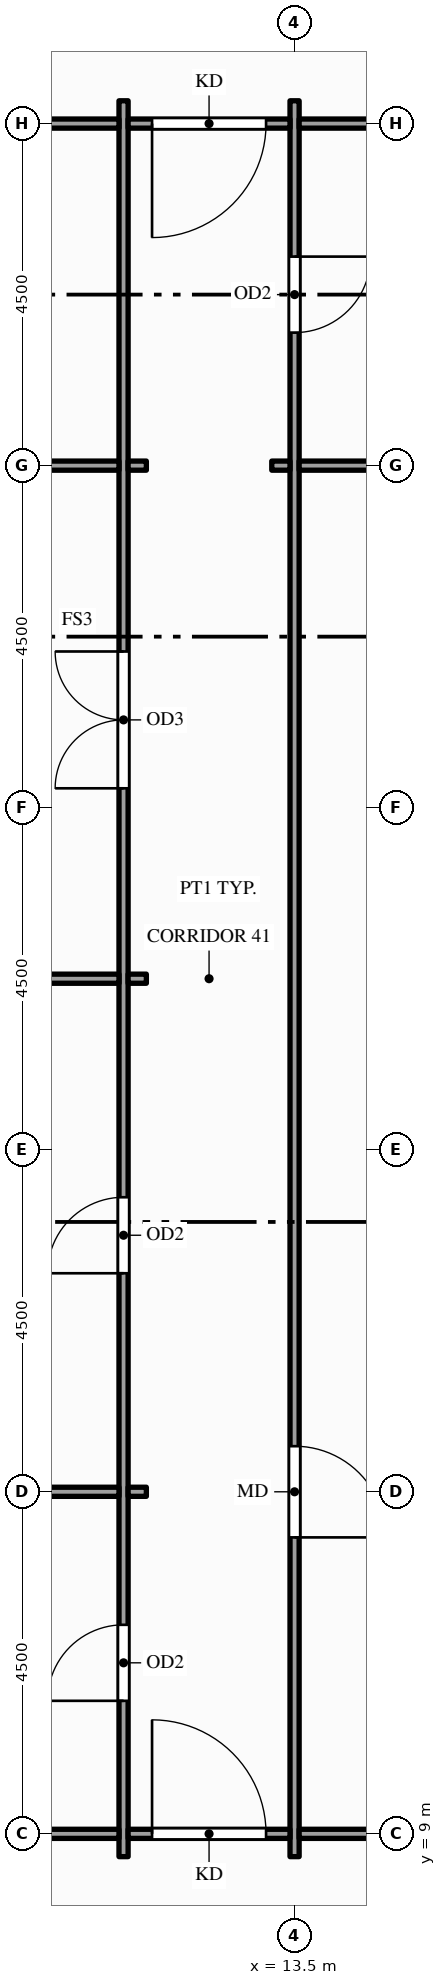
"""IFC4 building model, lengths in metres.
Left out: names, types, materials, properties, quantities, classifications, styles, units other than length and angle.
Written with IfcOpenShell. Run it as: python <this file> out.ifc"""

import sys

from ifc_helpers import new_model, si_unit, direction, frame, frame_2d, origin, place, context, subcontext, project, spatial, rectangle, extrude, element, fill, save


model = new_model("IFC4")
c1 = context("Model", 3, precision=1e-05, world=origin(), true_north=direction((0.0, 1.0)))
c2 = subcontext(c1, "Body", "Model", "MODEL_VIEW")
j1 = project(units=[si_unit("LENGTHUNIT", "METRE"), si_unit("PLANEANGLEUNIT", "RADIAN")], contexts=[c1])
p1 = place(None, origin())
s1 = spatial("IfcSite", under=j1, at=p1, CompositionType="ELEMENT")
p2 = place(p1, origin())
s2 = spatial("IfcBuilding", under=s1, at=p2, CompositionType="ELEMENT")
p3 = place(p2, frame((0.0, 0.0, 57.0)))
s3 = spatial("IfcBuildingStorey", under=s2, at=p3, CompositionType="ELEMENT", Elevation=57.0)
p4 = place(p3, frame((11.25, 8.7, 0.0), z_axis=(0.0, 0.0, 1.0), x_axis=(0.0, 1.0, 0.0)))
e1 = element("IfcWall", 1, at=p4, inside=s3, PredefinedType="PARTITIONING", context=c2, shape_type="SweptSolid", body=[
    extrude(rectangle(XDim=23.1, YDim=0.12, at=frame_2d((11.55, 0.0))), origin(), (0.0, 0.0, 1.0), 2.6),
])
p5 = place(p4, frame((2.05, 0.0, 0.0)))
e2 = element("IfcOpeningElement", 2, at=p5, cuts=e1, PredefinedType="OPENING", context=c2, shape_type="SweptSolid", body=[
    extrude(rectangle(XDim=1.0, YDim=2.1, at=frame_2d((0.5, 1.05))), frame((0.0, 0.07, 0.0), z_axis=(0.0, -1.0, 0.0), x_axis=(1.0, 0.0, 0.0)), (0.0, 0.0, 1.0), 0.14),
])
p6 = place(p4, frame((7.675, 0.0, 0.0)))
e3 = element("IfcOpeningElement", 3, at=p6, cuts=e1, PredefinedType="OPENING", context=c2, shape_type="SweptSolid", body=[
    extrude(rectangle(XDim=1.0, YDim=2.1, at=frame_2d((0.5, 1.05))), frame((0.0, 0.07, 0.0), z_axis=(0.0, -1.0, 0.0), x_axis=(1.0, 0.0, 0.0)), (0.0, 0.0, 1.0), 0.14),
])
p7 = place(p4, frame((14.055, 0.0, 0.0)))
e4 = element("IfcOpeningElement", 4, at=p7, cuts=e1, PredefinedType="OPENING", context=c2, shape_type="SweptSolid", body=[
    extrude(rectangle(XDim=1.8, YDim=2.1, at=frame_2d((0.9, 1.05))), frame((0.0, 0.07, 0.0), z_axis=(0.0, -1.0, 0.0), x_axis=(1.0, 0.0, 0.0)), (0.0, 0.0, 1.0), 0.14),
])
p8 = place(p3, frame((13.5, 8.7, 0.0), z_axis=(0.0, 0.0, 1.0), x_axis=(0.0, 1.0, 0.0)))
e5 = element("IfcWall", 5, at=p8, inside=s3, PredefinedType="PARTITIONING", context=c2, shape_type="SweptSolid", body=[
    extrude(rectangle(XDim=23.1, YDim=0.12, at=frame_2d((11.55, 0.0))), origin(), (0.0, 0.0, 1.0), 2.6),
])
p9 = place(p8, frame((20.05, 0.0, 0.0)))
e6 = element("IfcOpeningElement", 6, at=p9, cuts=e5, PredefinedType="OPENING", context=c2, shape_type="SweptSolid", body=[
    extrude(rectangle(XDim=1.0, YDim=2.1, at=frame_2d((0.5, 1.05))), frame((0.0, 0.07, 0.0), z_axis=(0.0, -1.0, 0.0), x_axis=(1.0, 0.0, 0.0)), (0.0, 0.0, 1.0), 0.14),
])
p10 = place(p8, frame((4.2, 0.0, 0.0)))
e7 = element("IfcOpeningElement", 7, at=p10, cuts=e5, PredefinedType="OPENING", context=c2, shape_type="SweptSolid", body=[
    extrude(rectangle(XDim=1.2, YDim=2.1, at=frame_2d((0.6, 1.05))), frame((0.0, 0.07, 0.0), z_axis=(0.0, -1.0, 0.0), x_axis=(1.0, 0.0, 0.0)), (0.0, 0.0, 1.0), 0.14),
])
p11 = place(p3, frame((0.15, 9.0, 0.0), z_axis=(0.0, 0.0, 1.0), x_axis=(1.0, 0.0, 0.0)))
e8 = element("IfcWall", 8, at=p11, inside=s3, PredefinedType="PARTITIONING", context=c2, shape_type="SweptSolid", body=[
    extrude(rectangle(XDim=11.04, YDim=0.12, at=frame_2d((5.52, 0.0))), origin(), (0.0, 0.0, 1.0), 2.938),
])
p12 = place(p3, frame((11.31, 9.0, 0.0), z_axis=(0.0, 0.0, 1.0), x_axis=(1.0, 0.0, 0.0)))
e9 = element("IfcWall", 9, at=p12, inside=s3, PredefinedType="PARTITIONING", context=c2, shape_type="SweptSolid", body=[
    extrude(rectangle(XDim=2.13, YDim=0.12, at=frame_2d((1.065, 0.0))), origin(), (0.0, 0.0, 1.0), 2.938),
])
p13 = place(p12, frame((0.315, 0.0, 0.0)))
e10 = element("IfcOpeningElement", 10, at=p13, cuts=e9, PredefinedType="OPENING", context=c2, shape_type="SweptSolid", body=[
    extrude(rectangle(XDim=1.5, YDim=2.1, at=frame_2d((0.75, 1.05))), frame((0.0, 0.07, 0.0), z_axis=(0.0, -1.0, 0.0), x_axis=(1.0, 0.0, 0.0)), (0.0, 0.0, 1.0), 0.14),
])
p14 = place(p3, frame((13.56, 9.0, 0.0), z_axis=(0.0, 0.0, 1.0), x_axis=(1.0, 0.0, 0.0)))
e11 = element("IfcWall", 11, at=p14, inside=s3, PredefinedType="PARTITIONING", context=c2, shape_type="SweptSolid", body=[
    extrude(rectangle(XDim=13.38, YDim=0.12, at=frame_2d((6.69, 0.0))), origin(), (0.0, 0.0, 1.0), 2.938),
])
p15 = place(p14, frame((3.54, 0.0, 0.0)))
e12 = element("IfcOpeningElement", 12, at=p15, cuts=e11, PredefinedType="OPENING", context=c2, shape_type="SweptSolid", body=[
    extrude(rectangle(XDim=1.8, YDim=2.1, at=frame_2d((0.9, 1.05))), frame((0.0, 0.07, 0.0), z_axis=(0.0, -1.0, 0.0), x_axis=(1.0, 0.0, 0.0)), (0.0, 0.0, 1.0), 0.14),
])
p16 = place(p3, frame((0.15, 13.5, 0.0), z_axis=(0.0, 0.0, 1.0), x_axis=(1.0, 0.0, 0.0)))
e13 = element("IfcWall", 13, at=p16, inside=s3, PredefinedType="PARTITIONING", context=c2, shape_type="SweptSolid", body=[
    extrude(rectangle(XDim=11.04, YDim=0.12, at=frame_2d((5.52, 0.0))), origin(), (0.0, 0.0, 1.0), 2.938),
])
p17 = place(p3, frame((11.31, 13.5, 0.0), z_axis=(0.0, 0.0, 1.0), x_axis=(1.0, 0.0, 0.0)))
e14 = element("IfcWall", 14, at=p17, inside=s3, PredefinedType="PARTITIONING", context=c2, shape_type="SweptSolid", body=[
    extrude(rectangle(XDim=0.24, YDim=0.12, at=frame_2d((0.12, 0.0))), origin(), (0.0, 0.0, 1.0), 2.938),
])
p18 = place(p3, frame((0.15, 20.25, 0.0), z_axis=(0.0, 0.0, 1.0), x_axis=(1.0, 0.0, 0.0)))
e15 = element("IfcWall", 15, at=p18, inside=s3, PredefinedType="PARTITIONING", context=c2, shape_type="SweptSolid", body=[
    extrude(rectangle(XDim=11.04, YDim=0.12, at=frame_2d((5.52, 0.0))), origin(), (0.0, 0.0, 1.0), 2.938),
])
p19 = place(p3, frame((11.31, 20.25, 0.0), z_axis=(0.0, 0.0, 1.0), x_axis=(1.0, 0.0, 0.0)))
e16 = element("IfcWall", 16, at=p19, inside=s3, PredefinedType="PARTITIONING", context=c2, shape_type="SweptSolid", body=[
    extrude(rectangle(XDim=0.24, YDim=0.12, at=frame_2d((0.12, 0.0))), origin(), (0.0, 0.0, 1.0), 2.938),
])
p20 = place(p3, frame((7.06, 27.0, 0.0), z_axis=(0.0, 0.0, 1.0), x_axis=(1.0, 0.0, 0.0)))
e17 = element("IfcWall", 17, at=p20, inside=s3, PredefinedType="PARTITIONING", context=c2, shape_type="SweptSolid", body=[
    extrude(rectangle(XDim=4.13, YDim=0.12, at=frame_2d((2.065, 0.0))), origin(), (0.0, 0.0, 1.0), 2.938),
])
for number, where, z_axis, x_axis in (
    (18, (11.31, 27.0, 0.0), (0.0, 0.0, 1.0), (1.0, 0.0, 0.0)),
    (19, (13.2, 27.0, 0.0), (0.0, 0.0, 1.0), (1.0, 0.0, 0.0)),
):
    element("IfcWall", number, at=place(p3, frame(where, z_axis=z_axis, x_axis=x_axis)), inside=s3, PredefinedType="PARTITIONING", context=c2, shape_type="SweptSolid", body=[
        extrude(rectangle(XDim=0.24, YDim=0.12, at=frame_2d((0.12, 0.0))), origin(), (0.0, 0.0, 1.0), 2.938),
    ])
p21 = place(p3, frame((13.56, 27.0, 0.0), z_axis=(0.0, 0.0, 1.0), x_axis=(1.0, 0.0, 0.0)))
e20 = element("IfcWall", 20, at=p21, inside=s3, PredefinedType="PARTITIONING", context=c2, shape_type="SweptSolid", body=[
    extrude(rectangle(XDim=7.57, YDim=0.12, at=frame_2d((3.785, 0.0))), origin(), (0.0, 0.0, 1.0), 2.938),
])
p22 = place(p3, frame((7.06, 31.5, 0.0), z_axis=(0.0, 0.0, 1.0), x_axis=(1.0, 0.0, 0.0)))
e21 = element("IfcWall", 21, at=p22, inside=s3, PredefinedType="PARTITIONING", context=c2, shape_type="SweptSolid", body=[
    extrude(rectangle(XDim=4.13, YDim=0.12, at=frame_2d((2.065, 0.0))), origin(), (0.0, 0.0, 1.0), 2.938),
])
p23 = place(p22, frame((1.565, 0.0, 0.0)))
e22 = element("IfcOpeningElement", 22, at=p23, cuts=e21, PredefinedType="OPENING", context=c2, shape_type="SweptSolid", body=[
    extrude(rectangle(XDim=1.0, YDim=2.1, at=frame_2d((0.5, 1.05))), frame((0.0, 0.07, 0.0), z_axis=(0.0, -1.0, 0.0), x_axis=(1.0, 0.0, 0.0)), (0.0, 0.0, 1.0), 0.14),
])
p24 = place(p3, frame((11.31, 31.5, 0.0), z_axis=(0.0, 0.0, 1.0), x_axis=(1.0, 0.0, 0.0)))
e23 = element("IfcWall", 23, at=p24, inside=s3, PredefinedType="PARTITIONING", context=c2, shape_type="SweptSolid", body=[
    extrude(rectangle(XDim=2.13, YDim=0.12, at=frame_2d((1.065, 0.0))), origin(), (0.0, 0.0, 1.0), 2.938),
])
p25 = place(p24, frame((0.315, 0.0, 0.0)))
e24 = element("IfcOpeningElement", 24, at=p25, cuts=e23, PredefinedType="OPENING", context=c2, shape_type="SweptSolid", body=[
    extrude(rectangle(XDim=1.5, YDim=2.1, at=frame_2d((0.75, 1.05))), frame((0.0, 0.07, 0.0), z_axis=(0.0, -1.0, 0.0), x_axis=(1.0, 0.0, 0.0)), (0.0, 0.0, 1.0), 0.14),
])
p26 = place(p3, frame((13.56, 31.5, 0.0), z_axis=(0.0, 0.0, 1.0), x_axis=(1.0, 0.0, 0.0)))
e25 = element("IfcWall", 25, at=p26, inside=s3, PredefinedType="PARTITIONING", context=c2, shape_type="SweptSolid", body=[
    extrude(rectangle(XDim=7.29, YDim=0.12, at=frame_2d((3.645, 0.0))), origin(), (0.0, 0.0, 1.0), 2.938),
])
p27 = place(p13, origin())
e26 = element("IfcDoor", 26, at=p27, inside=s3, OperationType="SINGLE_SWING_LEFT", PredefinedType="DOOR", context=c2, shape_type="SweptSolid", body=[
    extrude(rectangle(XDim=1.5, YDim=2.1, at=frame_2d((0.75, 1.05))), frame((0.0, 0.025, 0.0), z_axis=(0.0, -1.0, 0.0), x_axis=(1.0, 0.0, 0.0)), (0.0, 0.0, 1.0), 0.05),
])
fill(e10, e26)
p28 = place(p25, origin())
e27 = element("IfcDoor", 27, at=p28, inside=s3, OperationType="SINGLE_SWING_LEFT", PredefinedType="DOOR", context=c2, shape_type="SweptSolid", body=[
    extrude(rectangle(XDim=1.5, YDim=2.1, at=frame_2d((0.75, 1.05))), frame((0.0, 0.025, 0.0), z_axis=(0.0, -1.0, 0.0), x_axis=(1.0, 0.0, 0.0)), (0.0, 0.0, 1.0), 0.05),
])
fill(e24, e27)
p29 = place(p5, origin())
e28 = element("IfcDoor", 28, at=p29, inside=s3, OperationType="SINGLE_SWING_LEFT", PredefinedType="DOOR", context=c2, shape_type="SweptSolid", body=[
    extrude(rectangle(XDim=1.0, YDim=2.1, at=frame_2d((0.5, 1.05))), frame((0.0, 0.025, 0.0), z_axis=(0.0, -1.0, 0.0), x_axis=(1.0, 0.0, 0.0)), (0.0, 0.0, 1.0), 0.05),
])
fill(e2, e28)
p30 = place(p6, origin())
e29 = element("IfcDoor", 29, at=p30, inside=s3, OperationType="SINGLE_SWING_LEFT", PredefinedType="DOOR", context=c2, shape_type="SweptSolid", body=[
    extrude(rectangle(XDim=1.0, YDim=2.1, at=frame_2d((0.5, 1.05))), frame((0.0, 0.025, 0.0), z_axis=(0.0, -1.0, 0.0), x_axis=(1.0, 0.0, 0.0)), (0.0, 0.0, 1.0), 0.05),
])
fill(e3, e29)
p31 = place(p7, origin())
e30 = element("IfcDoor", 30, at=p31, inside=s3, OperationType="DOUBLE_DOOR_SINGLE_SWING", PredefinedType="DOOR", context=c2, shape_type="SweptSolid", body=[
    extrude(rectangle(XDim=1.8, YDim=2.1, at=frame_2d((0.9, 1.05))), frame((0.0, 0.025, 0.0), z_axis=(0.0, -1.0, 0.0), x_axis=(1.0, 0.0, 0.0)), (0.0, 0.0, 1.0), 0.05),
])
fill(e4, e30)
p32 = place(p9, origin())
e31 = element("IfcDoor", 31, at=p32, inside=s3, OperationType="SINGLE_SWING_RIGHT", PredefinedType="DOOR", context=c2, shape_type="SweptSolid", body=[
    extrude(rectangle(XDim=1.0, YDim=2.1, at=frame_2d((0.5, 1.05))), frame((0.0, 0.025, 0.0), z_axis=(0.0, -1.0, 0.0), x_axis=(1.0, 0.0, 0.0)), (0.0, 0.0, 1.0), 0.05),
])
fill(e6, e31)
p33 = place(p10, origin())
e32 = element("IfcDoor", 32, at=p33, inside=s3, OperationType="SINGLE_SWING_LEFT", PredefinedType="DOOR", context=c2, shape_type="SweptSolid", body=[
    extrude(rectangle(XDim=1.2, YDim=2.1, at=frame_2d((0.6, 1.05))), frame((0.0, 0.025, 0.0), z_axis=(0.0, -1.0, 0.0), x_axis=(1.0, 0.0, 0.0)), (0.0, 0.0, 1.0), 0.05),
])
fill(e7, e32)
save(model, sys.argv[1])
